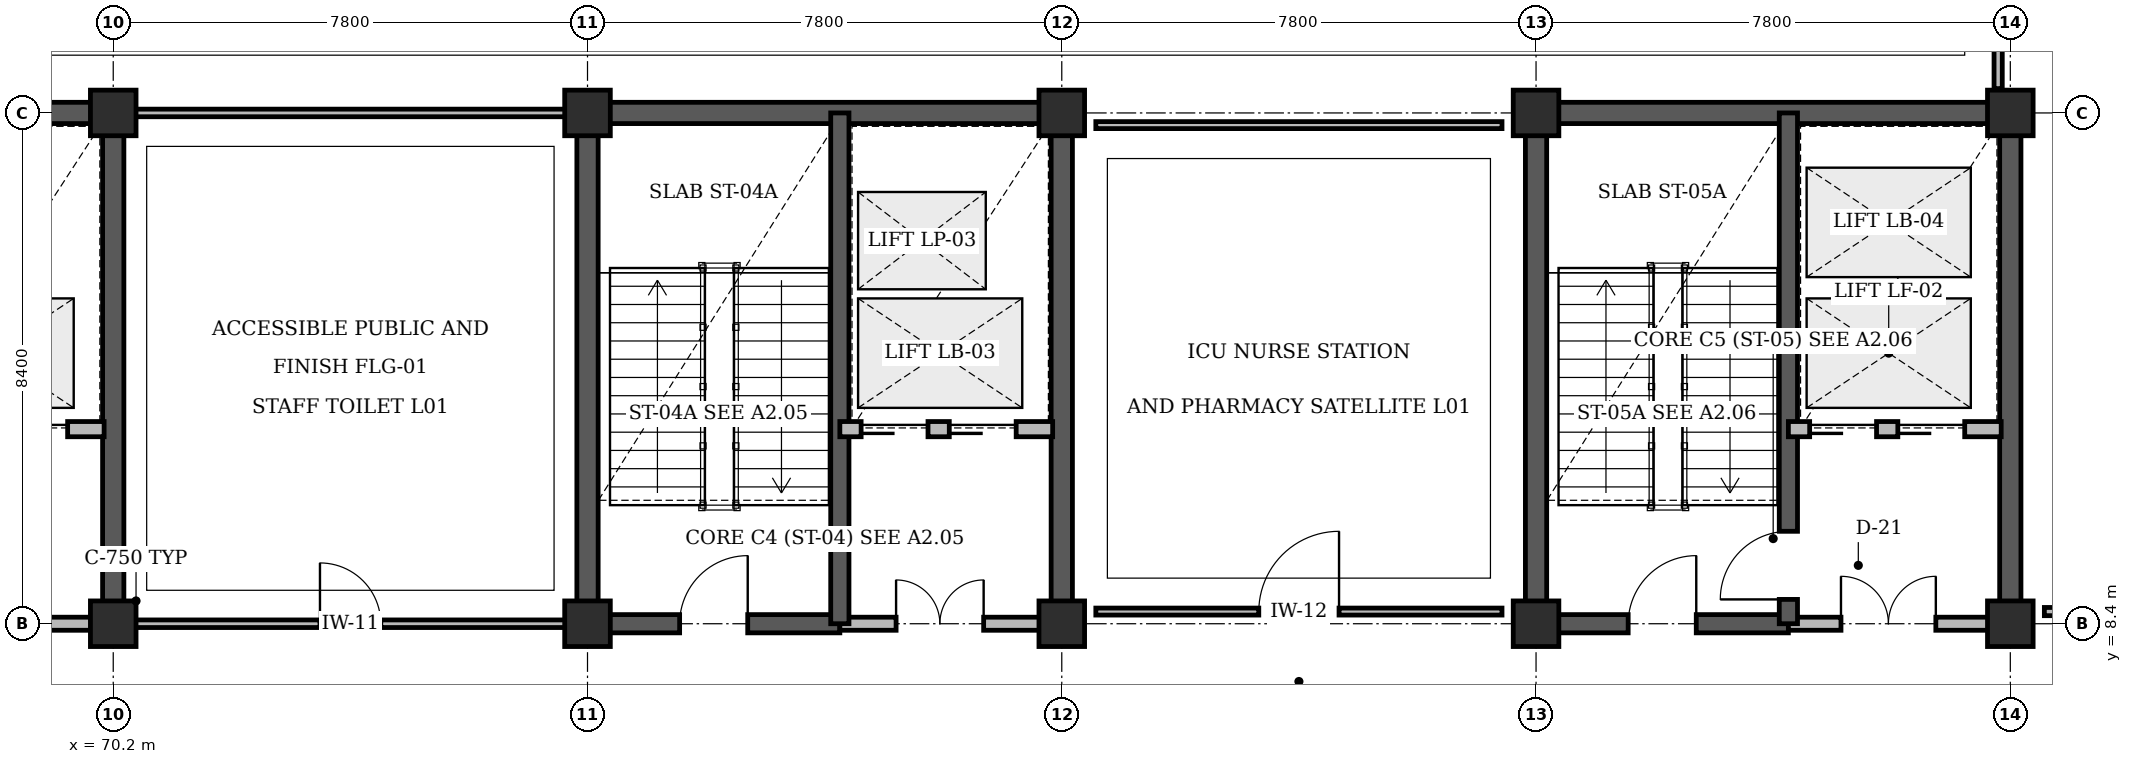
"""IFC4 building model, lengths in metres.
Left out: names, types, materials, properties, quantities, classifications, styles, units other than length and angle.
Written with IfcOpenShell. Run it as: python <this file> out.ifc"""

import sys

from ifc_helpers import new_model, si_unit, direction, frame, frame_2d, origin, origin_2d, place, context, subcontext, project, spatial, rectangle, extrude, element, fill, save


model = new_model("IFC4")
c1 = context("Model", 3, precision=1e-05, world=origin(), true_north=direction((0.0, 1.0)))
c2 = subcontext(c1, "Body", "Model", "MODEL_VIEW")
j1 = project(units=[si_unit("LENGTHUNIT", "METRE"), si_unit("PLANEANGLEUNIT", "RADIAN")], contexts=[c1])
p1 = place(None, origin())
s1 = spatial("IfcSite", under=j1, at=p1, CompositionType="ELEMENT")
p2 = place(p1, origin())
s2 = spatial("IfcBuilding", under=s1, at=p2, CompositionType="ELEMENT")
p3 = place(p2, frame((0.0, 0.0, 4.8)))
s3 = spatial("IfcBuildingStorey", under=s2, at=p3, CompositionType="ELEMENT", Elevation=4.8)
p4 = place(p3, frame((62.225, 16.8, 0.0), z_axis=(0.0, 0.0, 1.0), x_axis=(1.0, 0.0, 0.0)))
e1 = element("IfcWall", 1, at=p4, inside=s3, PredefinedType="SHEAR", context=c2, shape_type="SweptSolid", body=[
    extrude(rectangle(XDim=8.15, YDim=0.35, at=frame_2d((4.075, 0.0))), origin(), (0.0, 0.0, 1.0), 4.48),
])
p5 = place(p3, frame((70.2, 8.4, 0.0), z_axis=(0.0, 0.0, 1.0), x_axis=(0.0, 1.0, 0.0)))
e2 = element("IfcWall", 2, at=p5, inside=s3, PredefinedType="SHEAR", context=c2, shape_type="SweptSolid", body=[
    extrude(rectangle(XDim=8.4, YDim=0.35, at=frame_2d((4.2, 0.0))), origin(), (0.0, 0.0, 1.0), 4.48),
])
p6 = place(p3, frame((77.825, 16.8, 0.0), z_axis=(0.0, 0.0, 1.0), x_axis=(1.0, 0.0, 0.0)))
e3 = element("IfcWall", 3, at=p6, inside=s3, PredefinedType="SHEAR", context=c2, shape_type="SweptSolid", body=[
    extrude(rectangle(XDim=8.15, YDim=0.35, at=frame_2d((4.075, 0.0))), origin(), (0.0, 0.0, 1.0), 4.48),
])
for number, where, z_axis, x_axis in (
    (4, (78.0, 8.4, 0.0), (0.0, 0.0, 1.0), (0.0, 1.0, 0.0)),
    (5, (85.8, 8.4, 0.0), (0.0, 0.0, 1.0), (0.0, 1.0, 0.0)),
):
    element("IfcWall", number, at=place(p3, frame(where, z_axis=z_axis, x_axis=x_axis)), inside=s3, PredefinedType="SHEAR", context=c2, shape_type="SweptSolid", body=[
        extrude(rectangle(XDim=8.4, YDim=0.35, at=frame_2d((4.2, 0.0))), origin(), (0.0, 0.0, 1.0), 4.48),
    ])
p7 = place(p3, frame((93.425, 16.8, 0.0), z_axis=(0.0, 0.0, 1.0), x_axis=(1.0, 0.0, 0.0)))
e6 = element("IfcWall", 6, at=p7, inside=s3, PredefinedType="SHEAR", context=c2, shape_type="SweptSolid", body=[
    extrude(rectangle(XDim=8.15, YDim=0.35, at=frame_2d((4.075, 0.0))), origin(), (0.0, 0.0, 1.0), 4.48),
])
for number, where, z_axis, x_axis in (
    (7, (93.6, 8.4, 0.0), (0.0, 0.0, 1.0), (0.0, 1.0, 0.0)),
    (8, (101.4, 8.4, 0.0), (0.0, 0.0, 1.0), (0.0, 1.0, 0.0)),
):
    element("IfcWall", number, at=place(p3, frame(where, z_axis=z_axis, x_axis=x_axis)), inside=s3, PredefinedType="SHEAR", context=c2, shape_type="SweptSolid", body=[
        extrude(rectangle(XDim=8.4, YDim=0.35, at=frame_2d((4.2, 0.0))), origin(), (0.0, 0.0, 1.0), 4.48),
    ])
for number, where, z_axis, x_axis in (
    (9, (70.2, 8.4, 0.0), (0.0, 0.0, 1.0), (1.0, 0.0, 0.0)),
    (10, (70.2, 16.8, 0.0), (0.0, 0.0, 1.0), (1.0, 0.0, 0.0)),
    (11, (78.0, 8.4, 0.0), (0.0, 0.0, 1.0), (1.0, 0.0, 0.0)),
    (12, (78.0, 16.8, 0.0), (0.0, 0.0, 1.0), (1.0, 0.0, 0.0)),
    (13, (85.8, 8.4, 0.0), (0.0, 0.0, 1.0), (1.0, 0.0, 0.0)),
    (14, (85.8, 16.8, 0.0), (0.0, 0.0, 1.0), (1.0, 0.0, 0.0)),
    (15, (93.6, 8.4, 0.0), (0.0, 0.0, 1.0), (1.0, 0.0, 0.0)),
    (16, (93.6, 16.8, 0.0), (0.0, 0.0, 1.0), (1.0, 0.0, 0.0)),
    (17, (101.4, 8.4, 0.0), (0.0, 0.0, 1.0), (1.0, 0.0, 0.0)),
    (18, (101.4, 16.8, 0.0), (0.0, 0.0, 1.0), (1.0, 0.0, 0.0)),
):
    element("IfcColumn", number, at=place(p3, frame(where, z_axis=z_axis, x_axis=x_axis)), inside=s3, PredefinedType="COLUMN", context=c2, shape_type="SweptSolid", body=[
        extrude(rectangle(XDim=0.75, YDim=0.75, at=origin_2d()), origin(), (0.0, 0.0, 1.0), 4.8),
    ])
p8 = place(p3, frame((66.55, 8.4, 0.0), z_axis=(0.0, 0.0, 1.0), x_axis=(1.0, 0.0, 0.0)))
e19 = element("IfcWall", 19, at=p8, inside=s3, PredefinedType="STANDARD", context=c2, shape_type="SweptSolid", body=[
    extrude(rectangle(XDim=3.29, YDim=0.215, at=frame_2d((1.645, 0.0))), origin(), (0.0, 0.0, 1.0), 3.68),
])
p9 = place(p8, frame((0.925, 0.0, 0.0)))
e20 = element("IfcOpeningElement", 20, at=p9, cuts=e19, PredefinedType="OPENING", context=c2, shape_type="SweptSolid", body=[
    extrude(rectangle(XDim=1.44, YDim=2.2, at=frame_2d((0.72, 1.1))), frame((0.0, 0.118, 0.0), z_axis=(0.0, -1.0, 0.0), x_axis=(1.0, 0.0, 0.0)), (0.0, 0.0, 1.0), 0.235),
])
p10 = place(p3, frame((66.55, 11.6, 0.0), z_axis=(0.0, 0.0, 1.0), x_axis=(1.0, 0.0, 0.0)))
e21 = element("IfcWall", 21, at=p10, inside=s3, PredefinedType="STANDARD", context=c2, shape_type="SweptSolid", body=[
    extrude(rectangle(XDim=3.5, YDim=0.25, at=frame_2d((1.75, 0.0))), origin(), (0.0, 0.0, 1.0), 4.46),
])
p11 = place(p10, frame((0.35, 0.0, 0.0)))
e22 = element("IfcOpeningElement", 22, at=p11, cuts=e21, PredefinedType="OPENING", context=c2, shape_type="SweptSolid", body=[
    extrude(rectangle(XDim=1.1, YDim=2.2, at=frame_2d((0.55, 1.1))), frame((0.0, 0.135, 0.0), z_axis=(0.0, -1.0, 0.0), x_axis=(1.0, 0.0, 0.0)), (0.0, 0.0, 1.0), 0.27),
])
p12 = place(p10, frame((1.8, 0.0, 0.0)))
e23 = element("IfcOpeningElement", 23, at=p12, cuts=e21, PredefinedType="OPENING", context=c2, shape_type="SweptSolid", body=[
    extrude(rectangle(XDim=1.1, YDim=2.2, at=frame_2d((0.55, 1.1))), frame((0.0, 0.135, 0.0), z_axis=(0.0, -1.0, 0.0), x_axis=(1.0, 0.0, 0.0)), (0.0, 0.0, 1.0), 0.27),
])
p13 = place(p3, frame((78.0, 8.4, 0.0), z_axis=(0.0, 0.0, 1.0), x_axis=(1.0, 0.0, 0.0)))
e24 = element("IfcWall", 24, at=p13, inside=s3, PredefinedType="SHEAR", context=c2, shape_type="SweptSolid", body=[
    extrude(rectangle(XDim=4.15, YDim=0.3, at=frame_2d((2.075, 0.0))), origin(), (0.0, 0.0, 1.0), 4.8),
])
p14 = place(p13, frame((1.515, 0.0, 0.0)))
e25 = element("IfcOpeningElement", 25, at=p14, cuts=e24, PredefinedType="OPENING", context=c2, shape_type="SweptSolid", body=[
    extrude(rectangle(XDim=1.12, YDim=2.15, at=frame_2d((0.56, 1.075))), frame((0.0, 0.16, 0.0), z_axis=(0.0, -1.0, 0.0), x_axis=(1.0, 0.0, 0.0)), (0.0, 0.0, 1.0), 0.32),
])
p15 = place(p3, frame((82.15, 8.4, 0.0), z_axis=(0.0, 0.0, 1.0), x_axis=(1.0, 0.0, 0.0)))
e26 = element("IfcWall", 26, at=p15, inside=s3, PredefinedType="STANDARD", context=c2, shape_type="SweptSolid", body=[
    extrude(rectangle(XDim=3.29, YDim=0.215, at=frame_2d((1.645, 0.0))), origin(), (0.0, 0.0, 1.0), 3.68),
])
p16 = place(p15, frame((0.925, 0.0, 0.0)))
e27 = element("IfcOpeningElement", 27, at=p16, cuts=e26, PredefinedType="OPENING", context=c2, shape_type="SweptSolid", body=[
    extrude(rectangle(XDim=1.44, YDim=2.2, at=frame_2d((0.72, 1.1))), frame((0.0, 0.118, 0.0), z_axis=(0.0, -1.0, 0.0), x_axis=(1.0, 0.0, 0.0)), (0.0, 0.0, 1.0), 0.235),
])
p17 = place(p3, frame((82.15, 8.4, 0.0), z_axis=(0.0, 0.0, 1.0), x_axis=(0.0, 1.0, 0.0)))
e28 = element("IfcWall", 28, at=p17, inside=s3, PredefinedType="SHEAR", context=c2, shape_type="SweptSolid", body=[
    extrude(rectangle(XDim=8.4, YDim=0.3, at=frame_2d((4.2, 0.0))), origin(), (0.0, 0.0, 1.0), 4.8),
])
p18 = place(p3, frame((82.15, 11.6, 0.0), z_axis=(0.0, 0.0, 1.0), x_axis=(1.0, 0.0, 0.0)))
e29 = element("IfcWall", 29, at=p18, inside=s3, PredefinedType="STANDARD", context=c2, shape_type="SweptSolid", body=[
    extrude(rectangle(XDim=3.5, YDim=0.25, at=frame_2d((1.75, 0.0))), origin(), (0.0, 0.0, 1.0), 4.46),
])
p19 = place(p18, frame((0.35, 0.0, 0.0)))
e30 = element("IfcOpeningElement", 30, at=p19, cuts=e29, PredefinedType="OPENING", context=c2, shape_type="SweptSolid", body=[
    extrude(rectangle(XDim=1.1, YDim=2.2, at=frame_2d((0.55, 1.1))), frame((0.0, 0.135, 0.0), z_axis=(0.0, -1.0, 0.0), x_axis=(1.0, 0.0, 0.0)), (0.0, 0.0, 1.0), 0.27),
])
p20 = place(p18, frame((1.8, 0.0, 0.0)))
e31 = element("IfcOpeningElement", 31, at=p20, cuts=e29, PredefinedType="OPENING", context=c2, shape_type="SweptSolid", body=[
    extrude(rectangle(XDim=1.1, YDim=2.2, at=frame_2d((0.55, 1.1))), frame((0.0, 0.135, 0.0), z_axis=(0.0, -1.0, 0.0), x_axis=(1.0, 0.0, 0.0)), (0.0, 0.0, 1.0), 0.27),
])
p21 = place(p3, frame((93.6, 8.4, 0.0), z_axis=(0.0, 0.0, 1.0), x_axis=(1.0, 0.0, 0.0)))
e32 = element("IfcWall", 32, at=p21, inside=s3, PredefinedType="SHEAR", context=c2, shape_type="SweptSolid", body=[
    extrude(rectangle(XDim=4.15, YDim=0.3, at=frame_2d((2.075, 0.0))), origin(), (0.0, 0.0, 1.0), 4.8),
])
p22 = place(p21, frame((1.515, 0.0, 0.0)))
e33 = element("IfcOpeningElement", 33, at=p22, cuts=e32, PredefinedType="OPENING", context=c2, shape_type="SweptSolid", body=[
    extrude(rectangle(XDim=1.12, YDim=2.15, at=frame_2d((0.56, 1.075))), frame((0.0, 0.16, 0.0), z_axis=(0.0, -1.0, 0.0), x_axis=(1.0, 0.0, 0.0)), (0.0, 0.0, 1.0), 0.32),
])
p23 = place(p3, frame((97.75, 8.4, 0.0), z_axis=(0.0, 0.0, 1.0), x_axis=(1.0, 0.0, 0.0)))
e34 = element("IfcWall", 34, at=p23, inside=s3, PredefinedType="STANDARD", context=c2, shape_type="SweptSolid", body=[
    extrude(rectangle(XDim=3.29, YDim=0.215, at=frame_2d((1.645, 0.0))), origin(), (0.0, 0.0, 1.0), 3.68),
])
p24 = place(p23, frame((0.865, 0.0, 0.0)))
e35 = element("IfcOpeningElement", 35, at=p24, cuts=e34, PredefinedType="OPENING", context=c2, shape_type="SweptSolid", body=[
    extrude(rectangle(XDim=1.56, YDim=2.2, at=frame_2d((0.78, 1.1))), frame((0.0, 0.118, 0.0), z_axis=(0.0, -1.0, 0.0), x_axis=(1.0, 0.0, 0.0)), (0.0, 0.0, 1.0), 0.235),
])
p25 = place(p3, frame((97.75, 8.4, 0.0), z_axis=(0.0, 0.0, 1.0), x_axis=(0.0, 1.0, 0.0)))
e36 = element("IfcWall", 36, at=p25, inside=s3, PredefinedType="SHEAR", context=c2, shape_type="SweptSolid", body=[
    extrude(rectangle(XDim=8.4, YDim=0.3, at=frame_2d((4.2, 0.0))), origin(), (0.0, 0.0, 1.0), 4.8),
])
p26 = place(p25, frame((0.4, 0.0, 0.0)))
e37 = element("IfcOpeningElement", 37, at=p26, cuts=e36, PredefinedType="OPENING", context=c2, shape_type="SweptSolid", body=[
    extrude(rectangle(XDim=1.12, YDim=2.15, at=frame_2d((0.56, 1.075))), frame((0.0, 0.16, 0.0), z_axis=(0.0, -1.0, 0.0), x_axis=(1.0, 0.0, 0.0)), (0.0, 0.0, 1.0), 0.32),
])
p27 = place(p3, frame((97.75, 11.6, 0.0), z_axis=(0.0, 0.0, 1.0), x_axis=(1.0, 0.0, 0.0)))
e38 = element("IfcWall", 38, at=p27, inside=s3, PredefinedType="STANDARD", context=c2, shape_type="SweptSolid", body=[
    extrude(rectangle(XDim=3.5, YDim=0.25, at=frame_2d((1.75, 0.0))), origin(), (0.0, 0.0, 1.0), 4.46),
])
p28 = place(p27, frame((0.35, 0.0, 0.0)))
e39 = element("IfcOpeningElement", 39, at=p28, cuts=e38, PredefinedType="OPENING", context=c2, shape_type="SweptSolid", body=[
    extrude(rectangle(XDim=1.1, YDim=2.2, at=frame_2d((0.55, 1.1))), frame((0.0, 0.135, 0.0), z_axis=(0.0, -1.0, 0.0), x_axis=(1.0, 0.0, 0.0)), (0.0, 0.0, 1.0), 0.27),
])
p29 = place(p27, frame((1.8, 0.0, 0.0)))
e40 = element("IfcOpeningElement", 40, at=p29, cuts=e38, PredefinedType="OPENING", context=c2, shape_type="SweptSolid", body=[
    extrude(rectangle(XDim=1.1, YDim=2.2, at=frame_2d((0.55, 1.1))), frame((0.0, 0.135, 0.0), z_axis=(0.0, -1.0, 0.0), x_axis=(1.0, 0.0, 0.0)), (0.0, 0.0, 1.0), 0.27),
])
p30 = place(p3, frame((70.56, 8.4, 0.0), z_axis=(0.0, 0.0, 1.0), x_axis=(1.0, 0.0, 0.0)))
e41 = element("IfcWall", 41, at=p30, inside=s3, PredefinedType="PARTITIONING", context=c2, shape_type="SweptSolid", body=[
    extrude(rectangle(XDim=7.08, YDim=0.125, at=frame_2d((3.54, 0.0))), origin(), (0.0, 0.0, 1.0), 3.68),
])
p31 = place(p30, frame((3.04, 0.0, 0.0)))
e42 = element("IfcOpeningElement", 42, at=p31, cuts=e41, PredefinedType="OPENING", context=c2, shape_type="SweptSolid", body=[
    extrude(rectangle(XDim=1.0, YDim=2.1, at=frame_2d((0.5, 1.05))), frame((0.0, 0.073, 0.0), z_axis=(0.0, -1.0, 0.0), x_axis=(1.0, 0.0, 0.0)), (0.0, 0.0, 1.0), 0.145),
])
p32 = place(p3, frame((70.56, 16.8, 0.0), z_axis=(0.0, 0.0, 1.0), x_axis=(1.0, 0.0, 0.0)))
e43 = element("IfcWall", 43, at=p32, inside=s3, PredefinedType="PARTITIONING", context=c2, shape_type="SweptSolid", body=[
    extrude(rectangle(XDim=7.08, YDim=0.125, at=frame_2d((3.54, 0.0))), origin(), (0.0, 0.0, 1.0), 3.68),
])
p33 = place(p3, frame((86.36, 8.6, 0.0), z_axis=(0.0, 0.0, 1.0), x_axis=(1.0, 0.0, 0.0)))
e44 = element("IfcWall", 44, at=p33, inside=s3, PredefinedType="PARTITIONING", context=c2, shape_type="SweptSolid", body=[
    extrude(rectangle(XDim=6.68, YDim=0.115, at=frame_2d((3.34, 0.0))), origin(), (0.0, 0.0, 1.0), 3.68),
])
p34 = place(p33, frame((2.68, 0.0, 0.0)))
e45 = element("IfcOpeningElement", 45, at=p34, cuts=e44, PredefinedType="OPENING", context=c2, shape_type="SweptSolid", body=[
    extrude(rectangle(XDim=1.32, YDim=2.15, at=frame_2d((0.66, 1.075))), frame((0.0, 0.067, 0.0), z_axis=(0.0, -1.0, 0.0), x_axis=(1.0, 0.0, 0.0)), (0.0, 0.0, 1.0), 0.135),
])
p35 = place(p3, frame((86.36, 16.6, 0.0), z_axis=(0.0, 0.0, 1.0), x_axis=(1.0, 0.0, 0.0)))
e46 = element("IfcWall", 46, at=p35, inside=s3, PredefinedType="PARTITIONING", context=c2, shape_type="SweptSolid", body=[
    extrude(rectangle(XDim=6.68, YDim=0.115, at=frame_2d((3.34, 0.0))), origin(), (0.0, 0.0, 1.0), 3.68),
])
p36 = place(p3, frame((101.2, 17.2, 0.0), z_axis=(0.0, 0.0, 1.0), x_axis=(0.0, 1.0, 0.0)))
e47 = element("IfcWall", 47, at=p36, inside=s3, PredefinedType="PARTITIONING", context=c2, shape_type="SweptSolid", body=[
    extrude(rectangle(XDim=7.6, YDim=0.135, at=frame_2d((3.8, 0.0))), origin(), (0.0, 0.0, 1.0), 3.665),
])
p37 = place(p3, frame((101.96, 8.6, 0.0), z_axis=(0.0, 0.0, 1.0), x_axis=(1.0, 0.0, 0.0)))
e48 = element("IfcWall", 48, at=p37, inside=s3, PredefinedType="PARTITIONING", context=c2, shape_type="SweptSolid", body=[
    extrude(rectangle(XDim=30.24, YDim=0.135, at=frame_2d((15.12, 0.0))), origin(), (0.0, 0.0, 1.0), 3.68),
])
p38 = place(p37, frame((11.496, 0.0, 0.0)))
e49 = element("IfcOpeningElement", 49, at=p38, cuts=e48, PredefinedType="OPENING", context=c2, shape_type="SweptSolid", body=[
    extrude(rectangle(XDim=1.2, YDim=2.15, at=frame_2d((0.6, 1.075))), frame((0.0, 0.078, 0.0), z_axis=(0.0, -1.0, 0.0), x_axis=(1.0, 0.0, 0.0)), (0.0, 0.0, 1.0), 0.155),
])
p39 = place(p12, origin())
e50 = element("IfcDoor", 50, at=p39, inside=s3, OperationType="SLIDING_TO_LEFT", PredefinedType="DOOR", context=c2, shape_type="SweptSolid", body=[
    extrude(rectangle(XDim=1.1, YDim=2.2, at=frame_2d((0.55, 1.1))), frame((0.0, 0.025, 0.0), z_axis=(0.0, -1.0, 0.0), x_axis=(1.0, 0.0, 0.0)), (0.0, 0.0, 1.0), 0.05),
])
fill(e23, e50)
p40 = place(p14, origin())
e51 = element("IfcDoor", 51, at=p40, inside=s3, OperationType="SINGLE_SWING_RIGHT", PredefinedType="DOOR", context=c2, shape_type="SweptSolid", body=[
    extrude(rectangle(XDim=1.12, YDim=2.15, at=frame_2d((0.56, 1.075))), frame((0.0, 0.025, 0.0), z_axis=(0.0, -1.0, 0.0), x_axis=(1.0, 0.0, 0.0)), (0.0, 0.0, 1.0), 0.05),
])
fill(e25, e51)
p41 = place(p16, origin())
e52 = element("IfcDoor", 52, at=p41, inside=s3, OperationType="DOUBLE_DOOR_SINGLE_SWING", PredefinedType="DOOR", context=c2, shape_type="SweptSolid", body=[
    extrude(rectangle(XDim=1.44, YDim=2.2, at=frame_2d((0.72, 1.1))), frame((0.0, 0.025, 0.0), z_axis=(0.0, -1.0, 0.0), x_axis=(1.0, 0.0, 0.0)), (0.0, 0.0, 1.0), 0.05),
])
fill(e27, e52)
p42 = place(p19, origin())
e53 = element("IfcDoor", 53, at=p42, inside=s3, OperationType="SLIDING_TO_LEFT", PredefinedType="DOOR", context=c2, shape_type="SweptSolid", body=[
    extrude(rectangle(XDim=1.1, YDim=2.2, at=frame_2d((0.55, 1.1))), frame((0.0, 0.025, 0.0), z_axis=(0.0, -1.0, 0.0), x_axis=(1.0, 0.0, 0.0)), (0.0, 0.0, 1.0), 0.05),
])
fill(e30, e53)
p43 = place(p20, origin())
e54 = element("IfcDoor", 54, at=p43, inside=s3, OperationType="SLIDING_TO_LEFT", PredefinedType="DOOR", context=c2, shape_type="SweptSolid", body=[
    extrude(rectangle(XDim=1.1, YDim=2.2, at=frame_2d((0.55, 1.1))), frame((0.0, 0.025, 0.0), z_axis=(0.0, -1.0, 0.0), x_axis=(1.0, 0.0, 0.0)), (0.0, 0.0, 1.0), 0.05),
])
fill(e31, e54)
p44 = place(p22, origin())
e55 = element("IfcDoor", 55, at=p44, inside=s3, OperationType="SINGLE_SWING_RIGHT", PredefinedType="DOOR", context=c2, shape_type="SweptSolid", body=[
    extrude(rectangle(XDim=1.12, YDim=2.15, at=frame_2d((0.56, 1.075))), frame((0.0, 0.025, 0.0), z_axis=(0.0, -1.0, 0.0), x_axis=(1.0, 0.0, 0.0)), (0.0, 0.0, 1.0), 0.05),
])
fill(e33, e55)
p45 = place(p24, origin())
e56 = element("IfcDoor", 56, at=p45, inside=s3, OperationType="DOUBLE_DOOR_SINGLE_SWING", PredefinedType="DOOR", context=c2, shape_type="SweptSolid", body=[
    extrude(rectangle(XDim=1.56, YDim=2.2, at=frame_2d((0.78, 1.1))), frame((0.0, 0.025, 0.0), z_axis=(0.0, -1.0, 0.0), x_axis=(1.0, 0.0, 0.0)), (0.0, 0.0, 1.0), 0.05),
])
fill(e35, e56)
p46 = place(p26, origin())
e57 = element("IfcDoor", 57, at=p46, inside=s3, OperationType="SINGLE_SWING_LEFT", PredefinedType="DOOR", context=c2, shape_type="SweptSolid", body=[
    extrude(rectangle(XDim=1.12, YDim=2.15, at=frame_2d((0.56, 1.075))), frame((0.0, 0.025, 0.0), z_axis=(0.0, -1.0, 0.0), x_axis=(1.0, 0.0, 0.0)), (0.0, 0.0, 1.0), 0.05),
])
fill(e37, e57)
p47 = place(p28, origin())
e58 = element("IfcDoor", 58, at=p47, inside=s3, OperationType="SLIDING_TO_LEFT", PredefinedType="DOOR", context=c2, shape_type="SweptSolid", body=[
    extrude(rectangle(XDim=1.1, YDim=2.2, at=frame_2d((0.55, 1.1))), frame((0.0, 0.025, 0.0), z_axis=(0.0, -1.0, 0.0), x_axis=(1.0, 0.0, 0.0)), (0.0, 0.0, 1.0), 0.05),
])
fill(e39, e58)
p48 = place(p29, origin())
e59 = element("IfcDoor", 59, at=p48, inside=s3, OperationType="SLIDING_TO_LEFT", PredefinedType="DOOR", context=c2, shape_type="SweptSolid", body=[
    extrude(rectangle(XDim=1.1, YDim=2.2, at=frame_2d((0.55, 1.1))), frame((0.0, 0.025, 0.0), z_axis=(0.0, -1.0, 0.0), x_axis=(1.0, 0.0, 0.0)), (0.0, 0.0, 1.0), 0.05),
])
fill(e40, e59)
p49 = place(p31, origin())
e60 = element("IfcDoor", 60, at=p49, inside=s3, OperationType="SINGLE_SWING_LEFT", PredefinedType="DOOR", context=c2, shape_type="SweptSolid", body=[
    extrude(rectangle(XDim=1.0, YDim=2.1, at=frame_2d((0.5, 1.05))), frame((0.0, 0.025, 0.0), z_axis=(0.0, -1.0, 0.0), x_axis=(1.0, 0.0, 0.0)), (0.0, 0.0, 1.0), 0.05),
])
fill(e42, e60)
p50 = place(p34, origin())
e61 = element("IfcDoor", 61, at=p50, inside=s3, OperationType="SINGLE_SWING_RIGHT", PredefinedType="DOOR", context=c2, shape_type="SweptSolid", body=[
    extrude(rectangle(XDim=1.32, YDim=2.15, at=frame_2d((0.66, 1.075))), frame((0.0, 0.025, 0.0), z_axis=(0.0, -1.0, 0.0), x_axis=(1.0, 0.0, 0.0)), (0.0, 0.0, 1.0), 0.05),
])
fill(e45, e61)
save(model, sys.argv[1])
